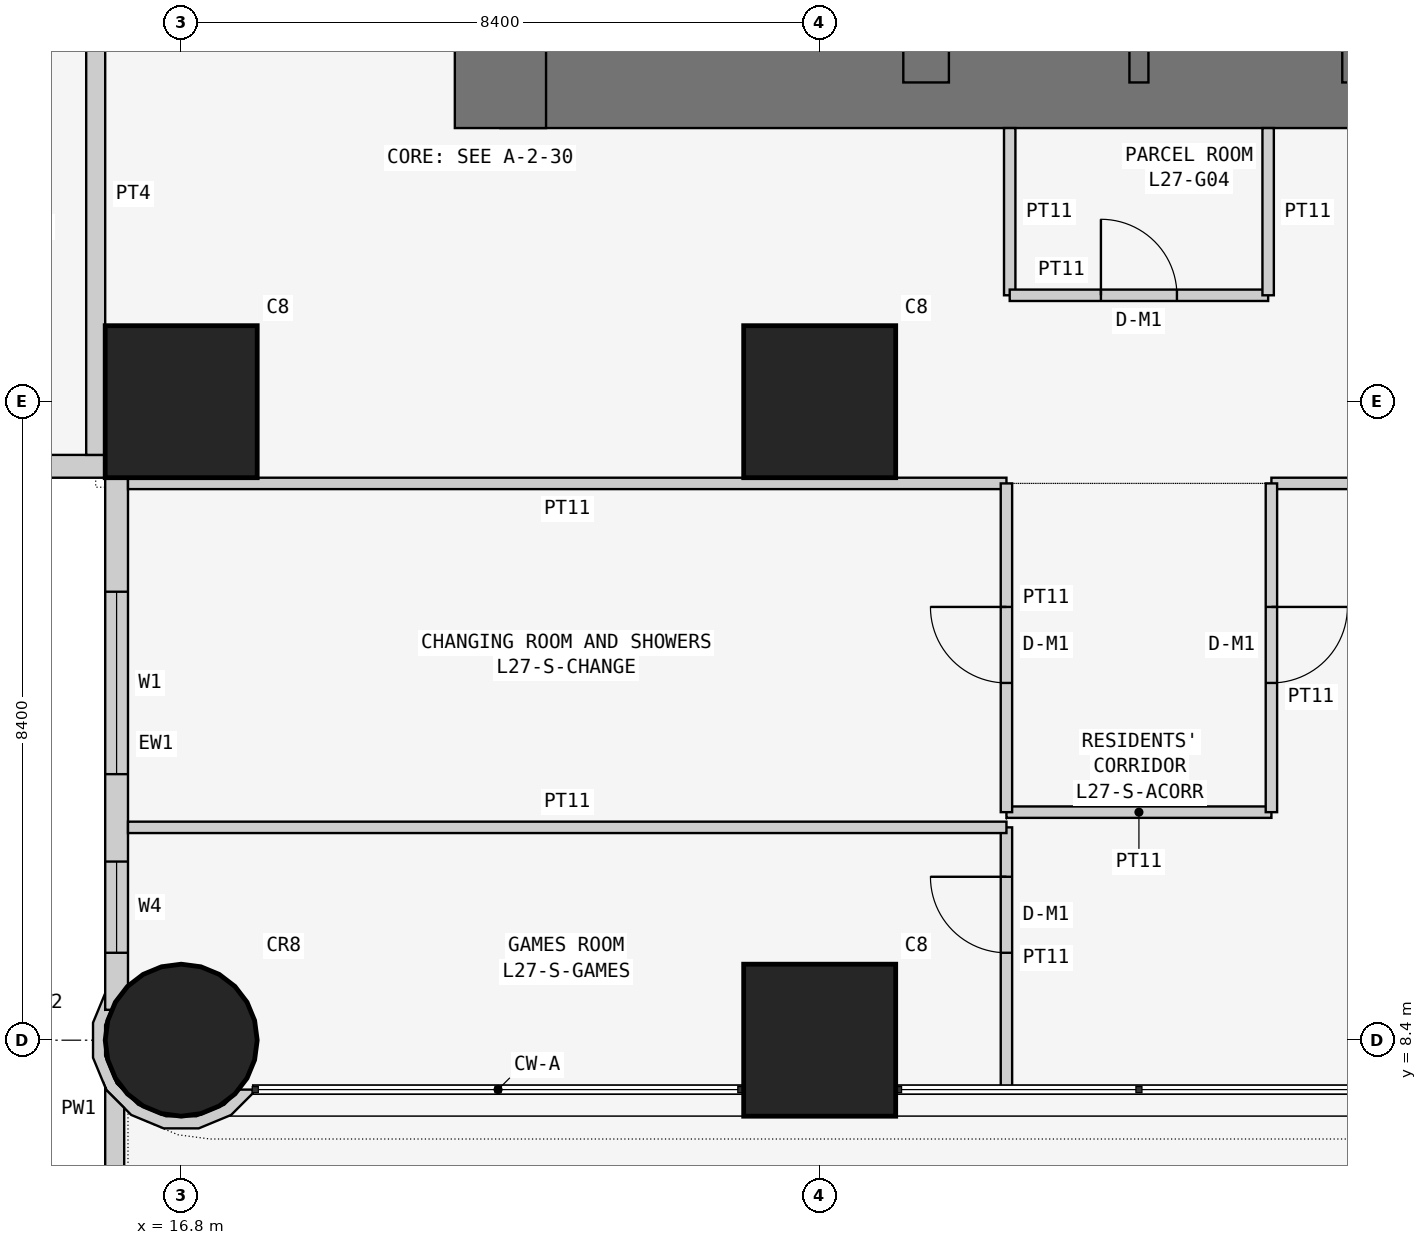
"""IFC4 building model, lengths in metres.
Left out: names, types, materials, properties, quantities, classifications, styles, units other than length and angle.
Written with IfcOpenShell. Run it as: python <this file> out.ifc"""

import sys

from ifc_helpers import new_model, si_unit, direction, frame, frame_2d, origin, origin_2d, place, context, subcontext, project, spatial, polyline, rectangle, circle, outline, extrude, element, fill, save


model = new_model("IFC4")
c1 = context("Model", 3, precision=1e-05, world=origin(), true_north=direction((0.0, 1.0)))
c2 = subcontext(c1, "Body", "Model", "MODEL_VIEW")
j1 = project(units=[si_unit("LENGTHUNIT", "METRE"), si_unit("PLANEANGLEUNIT", "RADIAN")], contexts=[c1])
p1 = place(None, origin())
s1 = spatial("IfcSite", under=j1, at=p1, CompositionType="ELEMENT")
p2 = place(p1, origin())
s2 = spatial("IfcBuilding", under=s1, at=p2, CompositionType="ELEMENT")
p3 = place(p2, frame((0.0, 0.0, 108.9)))
s3 = spatial("IfcBuildingStorey", under=s2, at=p3, CompositionType="ELEMENT", Elevation=108.9)
p4 = place(p3, frame((16.8, 8.4, 0.0), z_axis=(0.0, 0.0, 1.0), x_axis=(1.0, 0.0, 0.0)))
e1 = element("IfcColumn", 1, at=p4, inside=s3, PredefinedType="COLUMN", context=c2, shape_type="SweptSolid", body=[
    extrude(circle(Radius=1.0, at=origin_2d()), origin(), (0.0, 0.0, 1.0), 3.6),
])
for number, where, z_axis, x_axis in (
    (2, (16.8, 16.8, 0.0), (0.0, 0.0, 1.0), (1.0, 0.0, 0.0)),
    (3, (25.2, 8.4, 0.0), (0.0, 0.0, 1.0), (1.0, 0.0, 0.0)),
    (4, (25.2, 16.8, 0.0), (0.0, 0.0, 1.0), (1.0, 0.0, 0.0)),
):
    element("IfcColumn", number, at=place(p3, frame(where, z_axis=z_axis, x_axis=x_axis)), inside=s3, PredefinedType="COLUMN", context=c2, shape_type="SweptSolid", body=[
        extrude(rectangle(XDim=2.0, YDim=2.0, at=origin_2d()), origin(), (0.0, 0.0, 1.0), 3.6),
    ])
p5 = place(p3, frame((21.0, 21.0, 0.0), z_axis=(0.0, 0.0, 1.0), x_axis=(1.0, 0.0, 0.0)))
e5 = element("IfcWall", 5, at=p5, inside=s3, PredefinedType="SHEAR", context=c2, shape_type="SweptSolid", body=[
    extrude(rectangle(XDim=17.4, YDim=1.2, at=frame_2d((8.7, 0.0))), origin(), (0.0, 0.0, 1.0), 3.6),
])
p6 = place(p3, frame((21.0, 37.8, 0.0), z_axis=(0.0, 0.0, 1.0), x_axis=(0.0, -1.0, 0.0)))
e6 = element("IfcWall", 6, at=p6, inside=s3, PredefinedType="SHEAR", context=c2, shape_type="SweptSolid", body=[
    extrude(rectangle(XDim=17.4, YDim=1.2, at=frame_2d((8.7, 0.0))), origin(), (0.0, 0.0, 1.0), 3.6),
])
p7 = place(p6, frame((5.4, 0.0, 0.0)))
e7 = element("IfcOpeningElement", 7, at=p7, cuts=e6, PredefinedType="OPENING", context=c2, shape_type="SweptSolid", body=[
    extrude(rectangle(XDim=1.2, YDim=2.1, at=frame_2d((0.6, 1.05))), frame((0.0, 0.61, 0.0), z_axis=(0.0, -1.0, 0.0), x_axis=(1.0, 0.0, 0.0)), (0.0, 0.0, 1.0), 1.22),
])
p8 = place(p3, frame((26.6, 21.0, 0.0), z_axis=(0.0, 0.0, 1.0), x_axis=(0.0, 1.0, 0.0)))
e8 = element("IfcWall", 8, at=p8, inside=s3, PredefinedType="SHEAR", context=c2, shape_type="SweptSolid", body=[
    extrude(rectangle(XDim=16.8, YDim=0.6, at=frame_2d((8.4, 0.0))), origin(), (0.0, 0.0, 1.0), 3.6),
])
p9 = place(p8, frame((10.4, 0.0, 0.0)))
e9 = element("IfcOpeningElement", 9, at=p9, cuts=e8, PredefinedType="OPENING", context=c2, shape_type="SweptSolid", body=[
    extrude(rectangle(XDim=1.2, YDim=2.1, at=frame_2d((0.6, 1.05))), frame((0.0, 0.31, 0.0), z_axis=(0.0, -1.0, 0.0), x_axis=(1.0, 0.0, 0.0)), (0.0, 0.0, 1.0), 0.62),
])
for number, where, z_axis, x_axis in (
    (10, (29.4, 21.0, 0.0), (0.0, 0.0, 1.0), (0.0, 1.0, 0.0)),
    (11, (32.2, 21.0, 0.0), (0.0, 0.0, 1.0), (0.0, 1.0, 0.0)),
):
    element("IfcWall", number, at=place(p3, frame(where, z_axis=z_axis, x_axis=x_axis)), inside=s3, PredefinedType="SHEAR", context=c2, shape_type="SweptSolid", body=[
        extrude(rectangle(XDim=3.2, YDim=0.25, at=frame_2d((1.6, 0.0))), origin(), (0.0, 0.0, 1.0), 3.6),
    ])
p10 = place(p3, frame((0.4, 15.95, 0.0), z_axis=(0.0, 0.0, 1.0), x_axis=(1.0, 0.0, 0.0)))
e12 = element("IfcWall", 12, at=p10, inside=s3, PredefinedType="SOLIDWALL", context=c2, shape_type="SweptSolid", body=[
    extrude(rectangle(XDim=15.7, YDim=0.3, at=frame_2d((7.85, 0.0))), origin(), (0.0, 0.0, 1.0), 3.45),
])
p11 = place(p10, frame((12.4, 0.0, 0.9)))
e13 = element("IfcOpeningElement", 13, at=p11, cuts=e12, PredefinedType="OPENING", context=c2, shape_type="SweptSolid", body=[
    extrude(rectangle(XDim=1.8, YDim=1.5, at=frame_2d((0.9, 0.75))), frame((0.0, 0.16, 0.0), z_axis=(0.0, -1.0, 0.0), x_axis=(1.0, 0.0, 0.0)), (0.0, 0.0, 1.0), 0.32),
])
p12 = place(p10, frame((9.55, 0.0, 1.5)))
e14 = element("IfcOpeningElement", 14, at=p12, cuts=e12, PredefinedType="OPENING", context=c2, shape_type="SweptSolid", body=[
    extrude(rectangle(XDim=0.9, YDim=0.7, at=frame_2d((0.45, 0.35))), frame((0.0, 0.16, 0.0), z_axis=(0.0, -1.0, 0.0), x_axis=(1.0, 0.0, 0.0)), (0.0, 0.0, 1.0), 0.32),
])
p13 = place(p10, frame((5.1, 0.0, 0.9)))
e15 = element("IfcOpeningElement", 15, at=p13, cuts=e12, PredefinedType="OPENING", context=c2, shape_type="SweptSolid", body=[
    extrude(rectangle(XDim=1.8, YDim=1.5, at=frame_2d((0.9, 0.75))), frame((0.0, 0.16, 0.0), z_axis=(0.0, -1.0, 0.0), x_axis=(1.0, 0.0, 0.0)), (0.0, 0.0, 1.0), 0.32),
])
p14 = place(p10, frame((2.0, 0.0, 0.0)))
e16 = element("IfcOpeningElement", 16, at=p14, cuts=e12, PredefinedType="OPENING", context=c2, shape_type="SweptSolid", body=[
    extrude(rectangle(XDim=0.9, YDim=2.4, at=frame_2d((0.45, 1.2))), frame((0.0, 0.16, 0.0), z_axis=(0.0, -1.0, 0.0), x_axis=(1.0, 0.0, 0.0)), (0.0, 0.0, 1.0), 0.32),
])
p15 = place(p10, frame((0.7, 0.0, 0.9)))
e17 = element("IfcOpeningElement", 17, at=p15, cuts=e12, PredefinedType="OPENING", context=c2, shape_type="SweptSolid", body=[
    extrude(rectangle(XDim=1.2, YDim=1.5, at=frame_2d((0.6, 0.75))), frame((0.0, 0.16, 0.0), z_axis=(0.0, -1.0, 0.0), x_axis=(1.0, 0.0, 0.0)), (0.0, 0.0, 1.0), 0.32),
])
p16 = place(p3, frame((15.95, 15.8, 0.0), z_axis=(0.0, 0.0, 1.0), x_axis=(0.0, -1.0, 0.0)))
e18 = element("IfcWall", 18, at=p16, inside=s3, PredefinedType="SOLIDWALL", context=c2, shape_type="SweptSolid", body=[
    extrude(rectangle(XDim=7.0, YDim=0.3, at=frame_2d((3.5, 0.0))), origin(), (0.0, 0.0, 1.0), 3.45),
])
p17 = place(p16, frame((1.5, 0.0, 0.9)))
e19 = element("IfcOpeningElement", 19, at=p17, cuts=e18, PredefinedType="OPENING", context=c2, shape_type="SweptSolid", body=[
    extrude(rectangle(XDim=2.4, YDim=1.5, at=frame_2d((1.2, 0.75))), frame((0.0, 0.16, 0.0), z_axis=(0.0, -1.0, 0.0), x_axis=(1.0, 0.0, 0.0)), (0.0, 0.0, 1.0), 0.32),
])
p18 = place(p16, frame((5.05, 0.0, 0.9)))
e20 = element("IfcOpeningElement", 20, at=p18, cuts=e18, PredefinedType="OPENING", context=c2, shape_type="SweptSolid", body=[
    extrude(rectangle(XDim=1.2, YDim=1.5, at=frame_2d((0.6, 0.75))), frame((0.0, 0.16, 0.0), z_axis=(0.0, -1.0, 0.0), x_axis=(1.0, 0.0, 0.0)), (0.0, 0.0, 1.0), 0.32),
])
p19 = place(p3, frame((15.881, 8.967, 0.0), z_axis=(0.0, 0.0, 1.0), x_axis=(-0.555974394895, -0.831199417842, 0.0)))
e21 = element("IfcWall", 21, at=p19, inside=s3, PredefinedType="SOLIDWALL", context=c2, shape_type="SweptSolid", body=[
    extrude(outline(polyline([(0.075, 2.077), (0.35, 2.022), (0.682, 1.801), (0.903, 1.47), (0.981, 1.08), (0.903, 0.689), (0.682, 0.358), (0.351, 0.137), (0.126, 0.092), (0.184, 0.026), (0.003, -0.095), (0.414, -0.013), (0.797, 0.243), (1.053, 0.627), (1.143, 1.08), (1.053, 1.532), (0.796, 1.916), (0.413, 2.172), (0.017, 2.251), (-0.023, 2.224), (0.075, 2.077)])), origin(), (0.0, 0.0, 1.0), 3.45),
])
p20 = place(p3, origin())
e22 = element("IfcWall", 22, at=p20, inside=s3, PredefinedType="PARAPET", context=c2, shape_type="SweptSolid", body=[
    extrude(outline(polyline([(42.812, -0.3), (42.59, -0.59), (42.3, -0.812), (41.962, -0.952), (41.6, -1.0), (17.2, -1.0), (16.838, -0.952), (16.5, -0.812), (16.21, -0.59), (15.988, -0.3), (15.848, 0.038), (15.8, 0.4), (15.8, 7.783), (15.817, 7.743), (16.05, 7.51), (16.05, 0.417), (16.091, 0.103), (16.206, -0.174), (16.388, -0.412), (16.626, -0.594), (16.903, -0.709), (17.216, -0.75), (41.583, -0.75), (41.897, -0.709), (42.174, -0.594), (42.412, -0.412), (42.594, -0.174), (42.709, 0.103), (42.75, 0.417), (42.75, 7.51), (42.983, 7.743), (43.0, 7.783), (43.0, 0.4), (42.952, 0.038), (42.812, -0.3)])), origin(), (0.0, 0.0, 1.0), 1.25),
])
p21 = place(p3, origin())
e23 = element("IfcWall", 23, at=p21, inside=s3, PredefinedType="PARAPET", context=c2, shape_type="SweptSolid", body=[
    extrude(outline(polyline([(15.988, 8.1), (16.06, 8.006), (16.06, 7.724), (15.951, 7.833), (15.8, 8.198), (15.8, 8.423), (15.854, 8.423), (15.988, 8.1)])), origin(), (0.0, 0.0, 1.0), 1.25),
])
p22 = place(p3, frame((27.7, 20.4, 0.0), z_axis=(0.0, 0.0, 1.0), x_axis=(0.0, -1.0, 0.0)))
e24 = element("IfcWall", 24, at=p22, inside=s3, PredefinedType="PARTITIONING", context=c2, shape_type="SweptSolid", body=[
    extrude(rectangle(XDim=2.2, YDim=0.15, at=frame_2d((1.1, 0.0))), origin(), (0.0, 0.0, 1.0), 3.45),
])
p23 = place(p3, frame((27.7, 18.2, 0.0), z_axis=(0.0, 0.0, 1.0), x_axis=(1.0, 0.0, 0.0)))
e25 = element("IfcWall", 25, at=p23, inside=s3, PredefinedType="PARTITIONING", context=c2, shape_type="SweptSolid", body=[
    extrude(rectangle(XDim=3.4, YDim=0.15, at=frame_2d((1.7, 0.0))), origin(), (0.0, 0.0, 1.0), 3.45),
])
p24 = place(p23, frame((1.2, 0.0, 0.0)))
e26 = element("IfcOpeningElement", 26, at=p24, cuts=e25, PredefinedType="OPENING", context=c2, shape_type="SweptSolid", body=[
    extrude(rectangle(XDim=1.0, YDim=2.1, at=frame_2d((0.5, 1.05))), frame((0.0, 0.085, 0.0), z_axis=(0.0, -1.0, 0.0), x_axis=(1.0, 0.0, 0.0)), (0.0, 0.0, 1.0), 0.17),
])
p25 = place(p3, frame((31.1, 18.2, 0.0), z_axis=(0.0, 0.0, 1.0), x_axis=(0.0, 1.0, 0.0)))
e27 = element("IfcWall", 27, at=p25, inside=s3, PredefinedType="PARTITIONING", context=c2, shape_type="SweptSolid", body=[
    extrude(rectangle(XDim=2.2, YDim=0.15, at=frame_2d((1.1, 0.0))), origin(), (0.0, 0.0, 1.0), 3.45),
])
for number, where, z_axis, x_axis in (
    (28, (42.7, 15.725, 0.0), (0.0, 0.0, 1.0), (-1.0, 0.0, 0.0)),
    (29, (27.657, 15.725, 0.0), (0.0, 0.0, 1.0), (-1.0, 0.0, 0.0)),
):
    element("IfcWall", number, at=place(p3, frame(where, z_axis=z_axis, x_axis=x_axis)), inside=s3, PredefinedType="PARTITIONING", context=c2, shape_type="SweptSolid", body=[
        extrude(rectangle(XDim=11.557, YDim=0.15, at=frame_2d((5.778, 0.0))), origin(), (0.0, 0.0, 1.0), 3.45),
    ])
p26 = place(p3, frame((15.675, 16.1, 0.0), z_axis=(0.0, 0.0, 1.0), x_axis=(0.0, 1.0, 0.0)))
e30 = element("IfcWall", 30, at=p26, inside=s3, PredefinedType="PARTITIONING", context=c2, shape_type="SweptSolid", body=[
    extrude(rectangle(XDim=6.871, YDim=0.25, at=frame_2d((3.436, 0.0))), origin(), (0.0, 0.0, 1.0), 3.45),
])
p27 = place(p3, frame((27.657, 11.4, 0.0), z_axis=(0.0, 0.0, 1.0), x_axis=(1.0, 0.0, 0.0)))
e31 = element("IfcWall", 31, at=p27, inside=s3, PredefinedType="PARTITIONING", context=c2, shape_type="SweptSolid", body=[
    extrude(rectangle(XDim=3.486, YDim=0.15, at=frame_2d((1.743, 0.0))), origin(), (0.0, 0.0, 1.0), 3.45),
])
p28 = place(p3, frame((31.143, 11.4, 0.0), z_axis=(0.0, 0.0, 1.0), x_axis=(0.0, 1.0, 0.0)))
e32 = element("IfcWall", 32, at=p28, inside=s3, PredefinedType="PARTITIONING", context=c2, shape_type="SweptSolid", body=[
    extrude(rectangle(XDim=4.325, YDim=0.15, at=frame_2d((2.163, 0.0))), origin(), (0.0, 0.0, 1.0), 3.45),
])
p29 = place(p28, frame((1.7, 0.0, 0.0)))
e33 = element("IfcOpeningElement", 33, at=p29, cuts=e32, PredefinedType="OPENING", context=c2, shape_type="SweptSolid", body=[
    extrude(rectangle(XDim=1.0, YDim=2.1, at=frame_2d((0.5, 1.05))), frame((0.0, 0.085, 0.0), z_axis=(0.0, -1.0, 0.0), x_axis=(1.0, 0.0, 0.0)), (0.0, 0.0, 1.0), 0.17),
])
p30 = place(p3, frame((27.657, 15.725, 0.0), z_axis=(0.0, 0.0, 1.0), x_axis=(0.0, -1.0, 0.0)))
e34 = element("IfcWall", 34, at=p30, inside=s3, PredefinedType="PARTITIONING", context=c2, shape_type="SweptSolid", body=[
    extrude(rectangle(XDim=4.325, YDim=0.15, at=frame_2d((2.163, 0.0))), origin(), (0.0, 0.0, 1.0), 3.45),
])
p31 = place(p30, frame((1.625, 0.0, 0.0)))
e35 = element("IfcOpeningElement", 35, at=p31, cuts=e34, PredefinedType="OPENING", context=c2, shape_type="SweptSolid", body=[
    extrude(rectangle(XDim=1.0, YDim=2.1, at=frame_2d((0.5, 1.05))), frame((0.0, 0.085, 0.0), z_axis=(0.0, -1.0, 0.0), x_axis=(1.0, 0.0, 0.0)), (0.0, 0.0, 1.0), 0.17),
])
p32 = place(p3, frame((27.657, 7.75, 0.0), z_axis=(0.0, 0.0, 1.0), x_axis=(0.0, 1.0, 0.0)))
e36 = element("IfcWall", 36, at=p32, inside=s3, PredefinedType="PARTITIONING", context=c2, shape_type="SweptSolid", body=[
    extrude(rectangle(XDim=3.45, YDim=0.15, at=frame_2d((1.725, 0.0))), origin(), (0.0, 0.0, 1.0), 3.45),
])
p33 = place(p32, frame((1.8, 0.0, 0.0)))
e37 = element("IfcOpeningElement", 37, at=p33, cuts=e36, PredefinedType="OPENING", context=c2, shape_type="SweptSolid", body=[
    extrude(rectangle(XDim=1.0, YDim=2.1, at=frame_2d((0.5, 1.05))), frame((0.0, 0.085, 0.0), z_axis=(0.0, -1.0, 0.0), x_axis=(1.0, 0.0, 0.0)), (0.0, 0.0, 1.0), 0.17),
])
p34 = place(p3, frame((16.1, 11.2, 0.0), z_axis=(0.0, 0.0, 1.0), x_axis=(1.0, 0.0, 0.0)))
e38 = element("IfcWall", 38, at=p34, inside=s3, PredefinedType="PARTITIONING", context=c2, shape_type="SweptSolid", body=[
    extrude(rectangle(XDim=11.557, YDim=0.15, at=frame_2d((5.778, 0.0))), origin(), (0.0, 0.0, 1.0), 3.45),
])
p35 = place(p17, origin())
e39 = element("IfcWindow", 39, at=p35, inside=s3, PartitioningType="SINGLE_PANEL", PredefinedType="WINDOW", context=c2, shape_type="SweptSolid", body=[
    extrude(rectangle(XDim=2.4, YDim=1.5, at=frame_2d((1.2, 0.75))), frame((0.0, 0.03, 0.0), z_axis=(0.0, -1.0, 0.0), x_axis=(1.0, 0.0, 0.0)), (0.0, 0.0, 1.0), 0.06),
])
fill(e19, e39)
p36 = place(p18, origin())
e40 = element("IfcWindow", 40, at=p36, inside=s3, PartitioningType="SINGLE_PANEL", PredefinedType="WINDOW", context=c2, shape_type="SweptSolid", body=[
    extrude(rectangle(XDim=1.2, YDim=1.5, at=frame_2d((0.6, 0.75))), frame((0.0, 0.03, 0.0), z_axis=(0.0, -1.0, 0.0), x_axis=(1.0, 0.0, 0.0)), (0.0, 0.0, 1.0), 0.06),
])
fill(e20, e40)
p37 = place(p24, origin())
e41 = element("IfcDoor", 41, at=p37, inside=s3, OperationType="SINGLE_SWING_LEFT", PredefinedType="DOOR", context=c2, shape_type="SweptSolid", body=[
    extrude(rectangle(XDim=1.0, YDim=2.1, at=frame_2d((0.5, 1.05))), frame((0.0, 0.025, 0.0), z_axis=(0.0, -1.0, 0.0), x_axis=(1.0, 0.0, 0.0)), (0.0, 0.0, 1.0), 0.05),
])
fill(e26, e41)
p38 = place(p29, frame((1.0, 0.0, 0.0), z_axis=(0.0, 0.0, 1.0), x_axis=(-1.0, 0.0, 0.0)))
e42 = element("IfcDoor", 42, at=p38, inside=s3, OperationType="SINGLE_SWING_LEFT", PredefinedType="DOOR", context=c2, shape_type="SweptSolid", body=[
    extrude(rectangle(XDim=1.0, YDim=2.1, at=frame_2d((0.5, 1.05))), frame((0.0, 0.025, 0.0), z_axis=(0.0, -1.0, 0.0), x_axis=(1.0, 0.0, 0.0)), (0.0, 0.0, 1.0), 0.05),
])
fill(e33, e42)
p39 = place(p31, frame((1.0, 0.0, 0.0), z_axis=(0.0, 0.0, 1.0), x_axis=(-1.0, 0.0, 0.0)))
e43 = element("IfcDoor", 43, at=p39, inside=s3, OperationType="SINGLE_SWING_RIGHT", PredefinedType="DOOR", context=c2, shape_type="SweptSolid", body=[
    extrude(rectangle(XDim=1.0, YDim=2.1, at=frame_2d((0.5, 1.05))), frame((0.0, 0.025, 0.0), z_axis=(0.0, -1.0, 0.0), x_axis=(1.0, 0.0, 0.0)), (0.0, 0.0, 1.0), 0.05),
])
fill(e35, e43)
p40 = place(p33, origin())
e44 = element("IfcDoor", 44, at=p40, inside=s3, OperationType="SINGLE_SWING_RIGHT", PredefinedType="DOOR", context=c2, shape_type="SweptSolid", body=[
    extrude(rectangle(XDim=1.0, YDim=2.1, at=frame_2d((0.5, 1.05))), frame((0.0, 0.025, 0.0), z_axis=(0.0, -1.0, 0.0), x_axis=(1.0, 0.0, 0.0)), (0.0, 0.0, 1.0), 0.05),
])
fill(e37, e44)
save(model, sys.argv[1])
